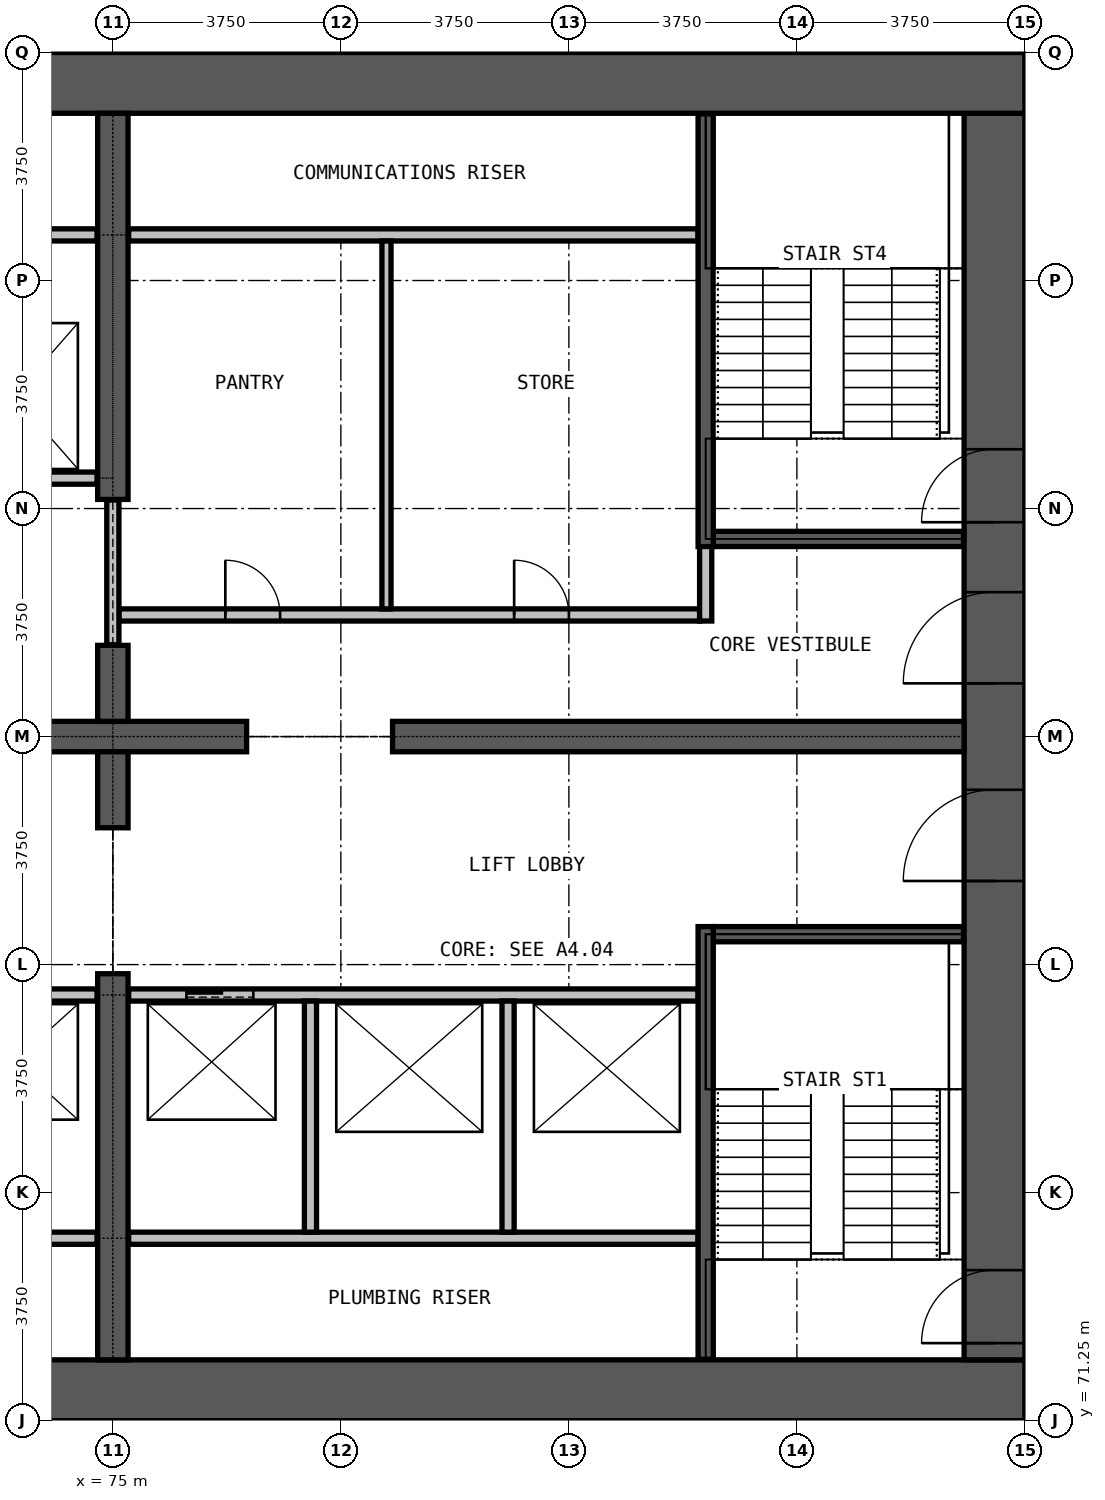
"""IFC4 building model, lengths in metres.
Left out: names, types, materials, properties, quantities, classifications, styles, units other than length and angle.
Written with IfcOpenShell. Run it as: python <this file> out.ifc"""

import sys

from ifc_helpers import new_model, si_unit, direction, frame, frame_2d, origin, place, context, subcontext, project, spatial, rectangle, extrude, element, fill, save


model = new_model("IFC4")
c1 = context("Model", 3, precision=1e-05, world=origin(), true_north=direction((0.0, 1.0)))
c2 = subcontext(c1, "Body", "Model", "MODEL_VIEW")
j1 = project(units=[si_unit("LENGTHUNIT", "METRE"), si_unit("PLANEANGLEUNIT", "RADIAN")], contexts=[c1])
p1 = place(None, origin())
s1 = spatial("IfcSite", under=j1, at=p1, CompositionType="ELEMENT")
p2 = place(p1, origin())
s2 = spatial("IfcBuilding", under=s1, at=p2, CompositionType="ELEMENT")
p3 = place(p2, frame((0.0, 0.0, 16.5)))
s3 = spatial("IfcBuildingStorey", under=s2, at=p3, CompositionType="ELEMENT", Elevation=16.5)
p4 = place(p3, frame((60.0, 71.75, 0.0), z_axis=(0.0, 0.0, 1.0), x_axis=(1.0, 0.0, 0.0)))
e1 = element("IfcWall", 1, at=p4, inside=s3, PredefinedType="SHEAR", context=c2, shape_type="SweptSolid", body=[
    extrude(rectangle(XDim=30.0, YDim=1.0, at=frame_2d((15.0, 0.0))), origin(), (0.0, 0.0, 1.0), 7.5),
])
p5 = place(p3, frame((89.5, 72.25, 0.0), z_axis=(0.0, 0.0, 1.0), x_axis=(0.0, 1.0, 0.0)))
e2 = element("IfcWall", 2, at=p5, inside=s3, PredefinedType="SHEAR", context=c2, shape_type="SweptSolid", body=[
    extrude(rectangle(XDim=20.5, YDim=1.0, at=frame_2d((10.25, 0.0))), origin(), (0.0, 0.0, 1.0), 7.5),
])
p6 = place(p5, frame((0.275, 0.0, 0.0)))
e3 = element("IfcOpeningElement", 3, at=p6, cuts=e2, PredefinedType="OPENING", context=c2, shape_type="SweptSolid", body=[
    extrude(rectangle(XDim=1.2, YDim=2.2, at=frame_2d((0.6, 1.1))), frame((0.0, 0.51, 0.0), z_axis=(0.0, -1.0, 0.0), x_axis=(1.0, 0.0, 0.0)), (0.0, 0.0, 1.0), 1.02),
])
p7 = place(p5, frame((13.775, 0.0, 0.0)))
e4 = element("IfcOpeningElement", 4, at=p7, cuts=e2, PredefinedType="OPENING", context=c2, shape_type="SweptSolid", body=[
    extrude(rectangle(XDim=1.2, YDim=2.2, at=frame_2d((0.6, 1.1))), frame((0.0, 0.51, 0.0), z_axis=(0.0, -1.0, 0.0), x_axis=(1.0, 0.0, 0.0)), (0.0, 0.0, 1.0), 1.02),
])
p8 = place(p5, frame((7.875, 0.0, 0.0)))
e5 = element("IfcOpeningElement", 5, at=p8, cuts=e2, PredefinedType="OPENING", context=c2, shape_type="SweptSolid", body=[
    extrude(rectangle(XDim=1.5, YDim=2.2, at=frame_2d((0.75, 1.1))), frame((0.0, 0.51, 0.0), z_axis=(0.0, -1.0, 0.0), x_axis=(1.0, 0.0, 0.0)), (0.0, 0.0, 1.0), 1.02),
])
p9 = place(p5, frame((11.125, 0.0, 0.0)))
e6 = element("IfcOpeningElement", 6, at=p9, cuts=e2, PredefinedType="OPENING", context=c2, shape_type="SweptSolid", body=[
    extrude(rectangle(XDim=1.5, YDim=2.2, at=frame_2d((0.75, 1.1))), frame((0.0, 0.51, 0.0), z_axis=(0.0, -1.0, 0.0), x_axis=(1.0, 0.0, 0.0)), (0.0, 0.0, 1.0), 1.02),
])
p10 = place(p3, frame((90.0, 93.25, 0.0), z_axis=(0.0, 0.0, 1.0), x_axis=(-1.0, 0.0, 0.0)))
e7 = element("IfcWall", 7, at=p10, inside=s3, PredefinedType="SHEAR", context=c2, shape_type="SweptSolid", body=[
    extrude(rectangle(XDim=30.0, YDim=1.0, at=frame_2d((15.0, 0.0))), origin(), (0.0, 0.0, 1.0), 7.5),
])
p11 = place(p3, frame((72.8, 82.5, 0.0), z_axis=(0.0, 0.0, 1.0), x_axis=(1.0, 0.0, 0.0)))
e8 = element("IfcWall", 8, at=p11, inside=s3, PredefinedType="SHEAR", context=c2, shape_type="SweptSolid", body=[
    extrude(rectangle(XDim=4.4, YDim=0.5, at=frame_2d((2.2, 0.0))), origin(), (0.0, 0.0, 1.0), 7.5),
])
p12 = place(p3, frame((79.6, 82.5, 0.0), z_axis=(0.0, 0.0, 1.0), x_axis=(1.0, 0.0, 0.0)))
e9 = element("IfcWall", 9, at=p12, inside=s3, PredefinedType="SHEAR", context=c2, shape_type="SweptSolid", body=[
    extrude(rectangle(XDim=9.4, YDim=0.5, at=frame_2d((4.7, 0.0))), origin(), (0.0, 0.0, 1.0), 7.5),
])
p13 = place(p3, frame((75.0, 72.25, 0.0), z_axis=(0.0, 0.0, 1.0), x_axis=(0.0, 1.0, 0.0)))
e10 = element("IfcWall", 10, at=p13, inside=s3, PredefinedType="SHEAR", context=c2, shape_type="SweptSolid", body=[
    extrude(rectangle(XDim=6.35, YDim=0.5, at=frame_2d((3.175, 0.0))), origin(), (0.0, 0.0, 1.0), 7.5),
])
for number, where, z_axis, x_axis in (
    (11, (75.0, 81.0, 0.0), (0.0, 0.0, 1.0), (0.0, 1.0, 0.0)),
    (12, (75.0, 82.75, 0.0), (0.0, 0.0, 1.0), (0.0, 1.0, 0.0)),
):
    element("IfcWall", number, at=place(p3, frame(where, z_axis=z_axis, x_axis=x_axis)), inside=s3, PredefinedType="SHEAR", context=c2, shape_type="SweptSolid", body=[
        extrude(rectangle(XDim=1.25, YDim=0.5, at=frame_2d((0.625, 0.0))), origin(), (0.0, 0.0, 1.0), 7.5),
    ])
p14 = place(p3, frame((75.0, 86.4, 0.0), z_axis=(0.0, 0.0, 1.0), x_axis=(0.0, 1.0, 0.0)))
e13 = element("IfcWall", 13, at=p14, inside=s3, PredefinedType="SHEAR", context=c2, shape_type="SweptSolid", body=[
    extrude(rectangle(XDim=6.35, YDim=0.5, at=frame_2d((3.175, 0.0))), origin(), (0.0, 0.0, 1.0), 7.5),
])
p15 = place(p3, frame((75.1, 84.5, 0.0), z_axis=(0.0, 0.0, 1.0), x_axis=(1.0, 0.0, 0.0)))
e14 = element("IfcWall", 14, at=p15, inside=s3, PredefinedType="PARTITIONING", context=c2, shape_type="SweptSolid", body=[
    extrude(rectangle(XDim=9.55, YDim=0.2, at=frame_2d((4.775, 0.0))), origin(), (0.0, 0.0, 1.0), 7.15),
])
p16 = place(p15, frame((1.75, 0.0, 0.0)))
e15 = element("IfcOpeningElement", 15, at=p16, cuts=e14, PredefinedType="OPENING", context=c2, shape_type="SweptSolid", body=[
    extrude(rectangle(XDim=0.9, YDim=2.2, at=frame_2d((0.45, 1.1))), frame((0.0, 0.11, 0.0), z_axis=(0.0, -1.0, 0.0), x_axis=(1.0, 0.0, 0.0)), (0.0, 0.0, 1.0), 0.22),
])
p17 = place(p15, frame((6.5, 0.0, 0.0)))
e16 = element("IfcOpeningElement", 16, at=p17, cuts=e14, PredefinedType="OPENING", context=c2, shape_type="SweptSolid", body=[
    extrude(rectangle(XDim=0.9, YDim=2.2, at=frame_2d((0.45, 1.1))), frame((0.0, 0.11, 0.0), z_axis=(0.0, -1.0, 0.0), x_axis=(1.0, 0.0, 0.0)), (0.0, 0.0, 1.0), 0.22),
])
p18 = place(p3, frame((75.26, 90.75, 0.0), z_axis=(0.0, 0.0, 1.0), x_axis=(1.0, 0.0, 0.0)))
e17 = element("IfcWall", 17, at=p18, inside=s3, PredefinedType="PARTITIONING", context=c2, shape_type="SweptSolid", body=[
    extrude(rectangle(XDim=9.365, YDim=0.2, at=frame_2d((4.683, 0.0))), origin(), (0.0, 0.0, 1.0), 7.15),
])
p19 = place(p3, frame((75.0, 84.01, 0.0), z_axis=(0.0, 0.0, 1.0), x_axis=(0.0, 1.0, 0.0)))
e18 = element("IfcWall", 18, at=p19, inside=s3, PredefinedType="PARTITIONING", context=c2, shape_type="SweptSolid", body=[
    extrude(rectangle(XDim=2.38, YDim=0.2, at=frame_2d((1.19, 0.0))), origin(), (0.0, 0.0, 1.0), 2.4),
])
p20 = place(p3, frame((84.75, 84.4, 0.0), z_axis=(0.0, 0.0, 1.0), x_axis=(0.0, 1.0, 0.0)))
e19 = element("IfcWall", 19, at=p20, inside=s3, PredefinedType="PARTITIONING", context=c2, shape_type="SweptSolid", body=[
    extrude(rectangle(XDim=1.475, YDim=0.2, at=frame_2d((0.738, 0.0))), origin(), (0.0, 0.0, 1.0), 7.15),
])
p21 = place(p3, frame((79.5, 84.6, 0.0), z_axis=(0.0, 0.0, 1.0), x_axis=(0.0, 1.0, 0.0)))
e20 = element("IfcWall", 20, at=p21, inside=s3, PredefinedType="PARTITIONING", context=c2, shape_type="SweptSolid", body=[
    extrude(rectangle(XDim=6.05, YDim=0.15, at=frame_2d((3.025, 0.0))), origin(), (0.0, 0.0, 1.0), 7.15),
])
for number, where, z_axis, x_axis in (
    (21, (65.375, 74.25, 0.0), (0.0, 0.0, 1.0), (1.0, 0.0, 0.0)),
    (22, (75.26, 74.25, 0.0), (0.0, 0.0, 1.0), (1.0, 0.0, 0.0)),
):
    element("IfcWall", number, at=place(p3, frame(where, z_axis=z_axis, x_axis=x_axis)), inside=s3, PredefinedType="PARTITIONING", context=c2, shape_type="SweptSolid", body=[
        extrude(rectangle(XDim=9.365, YDim=0.2, at=frame_2d((4.683, 0.0))), origin(), (0.0, 0.0, 1.0), 7.15),
    ])
p22 = place(p3, frame((65.375, 78.25, 0.0), z_axis=(0.0, 0.0, 1.0), x_axis=(1.0, 0.0, 0.0)))
e23 = element("IfcWall", 23, at=p22, inside=s3, PredefinedType="PARTITIONING", context=c2, shape_type="SweptSolid", body=[
    extrude(rectangle(XDim=9.365, YDim=0.2, at=frame_2d((4.683, 0.0))), origin(), (0.0, 0.0, 1.0), 7.15),
])
p23 = place(p22, frame((1.0, 0.0, 0.0)))
e24 = element("IfcOpeningElement", 24, at=p23, cuts=e23, PredefinedType="OPENING", context=c2, shape_type="SweptSolid", body=[
    extrude(rectangle(XDim=1.1, YDim=2.2, at=frame_2d((0.55, 1.1))), frame((0.0, 0.11, 0.0), z_axis=(0.0, -1.0, 0.0), x_axis=(1.0, 0.0, 0.0)), (0.0, 0.0, 1.0), 0.22),
])
p24 = place(p22, frame((4.175, 0.0, 0.0)))
e25 = element("IfcOpeningElement", 25, at=p24, cuts=e23, PredefinedType="OPENING", context=c2, shape_type="SweptSolid", body=[
    extrude(rectangle(XDim=1.1, YDim=2.2, at=frame_2d((0.55, 1.1))), frame((0.0, 0.11, 0.0), z_axis=(0.0, -1.0, 0.0), x_axis=(1.0, 0.0, 0.0)), (0.0, 0.0, 1.0), 0.22),
])
p25 = place(p22, frame((7.325, 0.0, 0.0)))
e26 = element("IfcOpeningElement", 26, at=p25, cuts=e23, PredefinedType="OPENING", context=c2, shape_type="SweptSolid", body=[
    extrude(rectangle(XDim=1.1, YDim=2.2, at=frame_2d((0.55, 1.1))), frame((0.0, 0.11, 0.0), z_axis=(0.0, -1.0, 0.0), x_axis=(1.0, 0.0, 0.0)), (0.0, 0.0, 1.0), 0.22),
])
p26 = place(p3, frame((75.26, 78.25, 0.0), z_axis=(0.0, 0.0, 1.0), x_axis=(1.0, 0.0, 0.0)))
e27 = element("IfcWall", 27, at=p26, inside=s3, PredefinedType="PARTITIONING", context=c2, shape_type="SweptSolid", body=[
    extrude(rectangle(XDim=9.365, YDim=0.2, at=frame_2d((4.683, 0.0))), origin(), (0.0, 0.0, 1.0), 7.15),
])
p27 = place(p26, frame((0.95, 0.0, 0.0)))
e28 = element("IfcOpeningElement", 28, at=p27, cuts=e27, PredefinedType="OPENING", context=c2, shape_type="SweptSolid", body=[
    extrude(rectangle(XDim=1.1, YDim=2.2, at=frame_2d((0.55, 1.1))), frame((0.0, 0.11, 0.0), z_axis=(0.0, -1.0, 0.0), x_axis=(1.0, 0.0, 0.0)), (0.0, 0.0, 1.0), 0.22),
])
p28 = place(p3, frame((65.375, 86.75, 0.0), z_axis=(0.0, 0.0, 1.0), x_axis=(1.0, 0.0, 0.0)))
e29 = element("IfcWall", 29, at=p28, inside=s3, PredefinedType="PARTITIONING", context=c2, shape_type="SweptSolid", body=[
    extrude(rectangle(XDim=9.365, YDim=0.2, at=frame_2d((4.683, 0.0))), origin(), (0.0, 0.0, 1.0), 7.15),
])
p29 = place(p28, frame((1.0, 0.0, 0.0)))
e30 = element("IfcOpeningElement", 30, at=p29, cuts=e29, PredefinedType="OPENING", context=c2, shape_type="SweptSolid", body=[
    extrude(rectangle(XDim=1.1, YDim=2.2, at=frame_2d((0.55, 1.1))), frame((0.0, 0.11, 0.0), z_axis=(0.0, -1.0, 0.0), x_axis=(1.0, 0.0, 0.0)), (0.0, 0.0, 1.0), 0.22),
])
p30 = place(p28, frame((4.175, 0.0, 0.0)))
e31 = element("IfcOpeningElement", 31, at=p30, cuts=e29, PredefinedType="OPENING", context=c2, shape_type="SweptSolid", body=[
    extrude(rectangle(XDim=1.1, YDim=2.2, at=frame_2d((0.55, 1.1))), frame((0.0, 0.11, 0.0), z_axis=(0.0, -1.0, 0.0), x_axis=(1.0, 0.0, 0.0)), (0.0, 0.0, 1.0), 0.22),
])
p31 = place(p28, frame((7.325, 0.0, 0.0)))
e32 = element("IfcOpeningElement", 32, at=p31, cuts=e29, PredefinedType="OPENING", context=c2, shape_type="SweptSolid", body=[
    extrude(rectangle(XDim=1.1, YDim=2.2, at=frame_2d((0.55, 1.1))), frame((0.0, 0.11, 0.0), z_axis=(0.0, -1.0, 0.0), x_axis=(1.0, 0.0, 0.0)), (0.0, 0.0, 1.0), 0.22),
])
p32 = place(p3, frame((65.375, 90.75, 0.0), z_axis=(0.0, 0.0, 1.0), x_axis=(1.0, 0.0, 0.0)))
e33 = element("IfcWall", 33, at=p32, inside=s3, PredefinedType="PARTITIONING", context=c2, shape_type="SweptSolid", body=[
    extrude(rectangle(XDim=9.365, YDim=0.2, at=frame_2d((4.683, 0.0))), origin(), (0.0, 0.0, 1.0), 7.15),
])
for number, where, z_axis, x_axis in (
    (34, (78.25, 74.35, 0.0), (0.0, 0.0, 1.0), (0.0, 1.0, 0.0)),
    (35, (81.5, 74.35, 0.0), (0.0, 0.0, 1.0), (0.0, 1.0, 0.0)),
):
    element("IfcWall", number, at=place(p3, frame(where, z_axis=z_axis, x_axis=x_axis)), inside=s3, PredefinedType="PARTITIONING", context=c2, shape_type="SweptSolid", body=[
        extrude(rectangle(XDim=3.8, YDim=0.2, at=frame_2d((1.9, 0.0))), origin(), (0.0, 0.0, 1.0), 7.15),
    ])
for number, where, z_axis, x_axis in (
    (36, (84.875, 79.25, 0.0), (0.0, 0.0, 1.0), (1.0, 0.0, 0.0)),
    (37, (84.875, 85.75, 0.0), (0.0, 0.0, 1.0), (1.0, 0.0, 0.0)),
):
    element("IfcWall", number, at=place(p3, frame(where, z_axis=z_axis, x_axis=x_axis)), inside=s3, PredefinedType="PARTITIONING", context=c2, shape_type="SweptSolid", body=[
        extrude(rectangle(XDim=4.115, YDim=0.25, at=frame_2d((2.058, 0.0))), origin(), (0.0, 0.0, 1.0), 7.15),
    ])
for number, where, z_axis, x_axis in (
    (38, (84.75, 72.26, 0.0), (0.0, 0.0, 1.0), (0.0, 1.0, 0.0)),
    (39, (84.75, 85.625, 0.0), (0.0, 0.0, 1.0), (0.0, 1.0, 0.0)),
):
    element("IfcWall", number, at=place(p3, frame(where, z_axis=z_axis, x_axis=x_axis)), inside=s3, PredefinedType="PARTITIONING", context=c2, shape_type="SweptSolid", body=[
        extrude(rectangle(XDim=7.115, YDim=0.25, at=frame_2d((3.558, 0.0))), origin(), (0.0, 0.0, 1.0), 7.15),
    ])
p33 = place(p27, origin())
e40 = element("IfcDoor", 40, at=p33, inside=s3, OperationType="DOUBLE_DOOR_SLIDING", PredefinedType="DOOR", context=c2, shape_type="SweptSolid", body=[
    extrude(rectangle(XDim=1.1, YDim=2.2, at=frame_2d((0.55, 1.1))), frame((0.0, 0.025, 0.0), z_axis=(0.0, -1.0, 0.0), x_axis=(1.0, 0.0, 0.0)), (0.0, 0.0, 1.0), 0.05),
])
fill(e28, e40)
p34 = place(p6, origin())
e41 = element("IfcDoor", 41, at=p34, inside=s3, OperationType="SINGLE_SWING_LEFT", PredefinedType="DOOR", context=c2, shape_type="SweptSolid", body=[
    extrude(rectangle(XDim=1.2, YDim=2.2, at=frame_2d((0.6, 1.1))), frame((0.0, 0.025, 0.0), z_axis=(0.0, -1.0, 0.0), x_axis=(1.0, 0.0, 0.0)), (0.0, 0.0, 1.0), 0.05),
])
fill(e3, e41)
p35 = place(p7, origin())
e42 = element("IfcDoor", 42, at=p35, inside=s3, OperationType="SINGLE_SWING_LEFT", PredefinedType="DOOR", context=c2, shape_type="SweptSolid", body=[
    extrude(rectangle(XDim=1.2, YDim=2.2, at=frame_2d((0.6, 1.1))), frame((0.0, 0.025, 0.0), z_axis=(0.0, -1.0, 0.0), x_axis=(1.0, 0.0, 0.0)), (0.0, 0.0, 1.0), 0.05),
])
fill(e4, e42)
p36 = place(p8, origin())
e43 = element("IfcDoor", 43, at=p36, inside=s3, OperationType="DOUBLE_DOOR_SINGLE_SWING", PredefinedType="DOOR", context=c2, shape_type="SweptSolid", body=[
    extrude(rectangle(XDim=1.5, YDim=2.2, at=frame_2d((0.75, 1.1))), frame((0.0, 0.025, 0.0), z_axis=(0.0, -1.0, 0.0), x_axis=(1.0, 0.0, 0.0)), (0.0, 0.0, 1.0), 0.05),
])
fill(e5, e43)
p37 = place(p9, origin())
e44 = element("IfcDoor", 44, at=p37, inside=s3, OperationType="DOUBLE_DOOR_SINGLE_SWING", PredefinedType="DOOR", context=c2, shape_type="SweptSolid", body=[
    extrude(rectangle(XDim=1.5, YDim=2.2, at=frame_2d((0.75, 1.1))), frame((0.0, 0.025, 0.0), z_axis=(0.0, -1.0, 0.0), x_axis=(1.0, 0.0, 0.0)), (0.0, 0.0, 1.0), 0.05),
])
fill(e6, e44)
p38 = place(p16, origin())
e45 = element("IfcDoor", 45, at=p38, inside=s3, OperationType="SINGLE_SWING_RIGHT", PredefinedType="DOOR", context=c2, shape_type="SweptSolid", body=[
    extrude(rectangle(XDim=0.9, YDim=2.2, at=frame_2d((0.45, 1.1))), frame((0.0, 0.025, 0.0), z_axis=(0.0, -1.0, 0.0), x_axis=(1.0, 0.0, 0.0)), (0.0, 0.0, 1.0), 0.05),
])
fill(e15, e45)
p39 = place(p17, origin())
e46 = element("IfcDoor", 46, at=p39, inside=s3, OperationType="SINGLE_SWING_LEFT", PredefinedType="DOOR", context=c2, shape_type="SweptSolid", body=[
    extrude(rectangle(XDim=0.9, YDim=2.2, at=frame_2d((0.45, 1.1))), frame((0.0, 0.025, 0.0), z_axis=(0.0, -1.0, 0.0), x_axis=(1.0, 0.0, 0.0)), (0.0, 0.0, 1.0), 0.05),
])
fill(e16, e46)
save(model, sys.argv[1])
